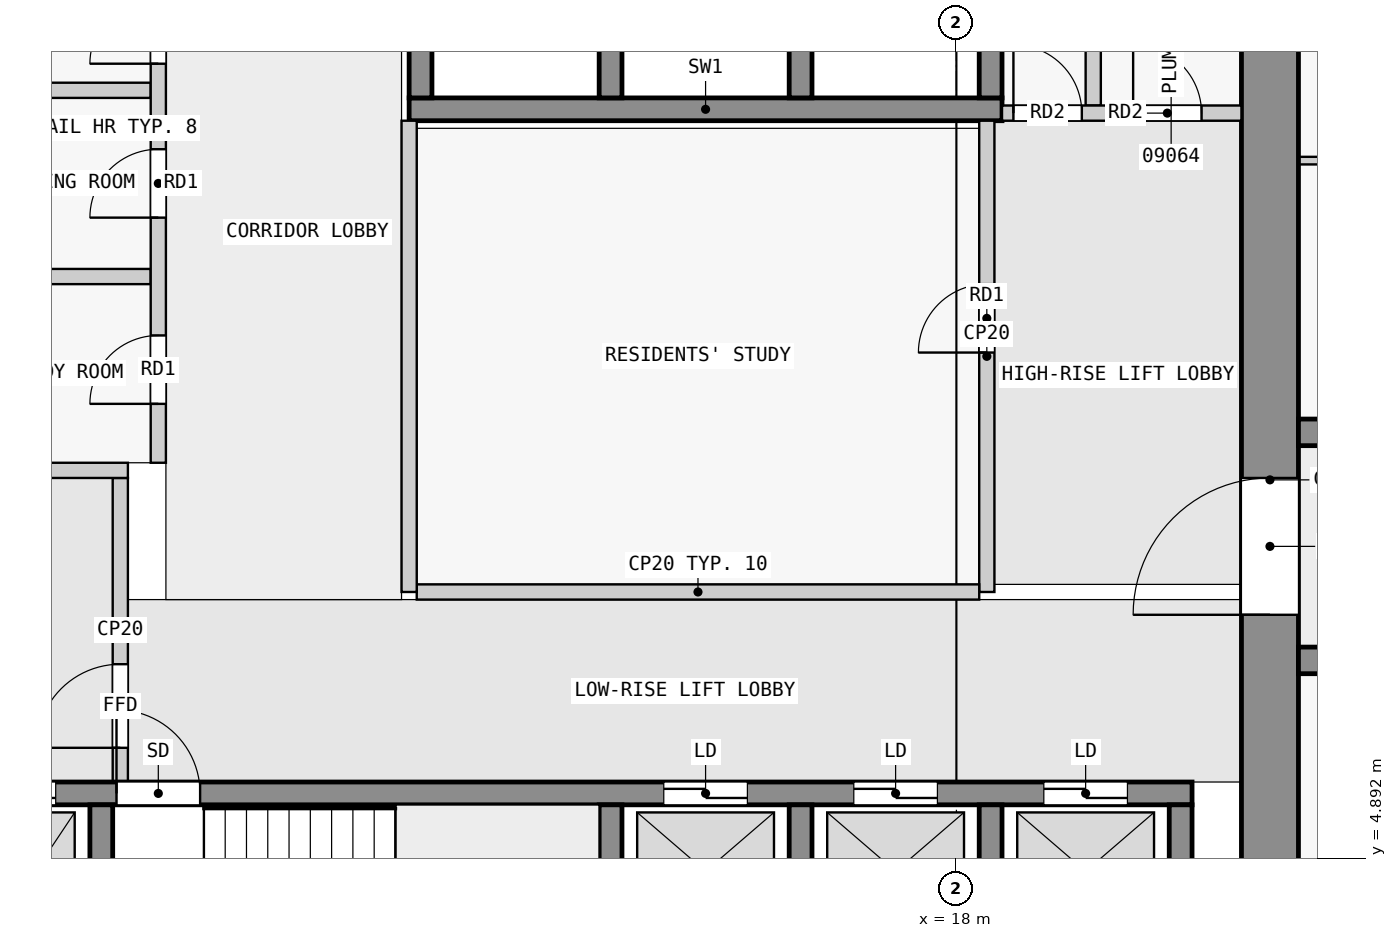
"""IFC4 building model, lengths in metres.
Left out: names, types, materials, properties, quantities, classifications, styles, units other than length and angle.
Written with IfcOpenShell. Run it as: python <this file> out.ifc"""

import sys

from ifc_helpers import new_model, si_unit, direction, frame, frame_2d, origin, place, context, subcontext, project, spatial, rectangle, extrude, element, fill, save


model = new_model("IFC4")
c1 = context("Model", 3, precision=1e-05, world=origin(), true_north=direction((0.0, 1.0)))
c2 = subcontext(c1, "Body", "Model", "MODEL_VIEW")
j1 = project(units=[si_unit("LENGTHUNIT", "METRE"), si_unit("PLANEANGLEUNIT", "RADIAN")], contexts=[c1])
p1 = place(None, origin())
s1 = spatial("IfcSite", under=j1, at=p1, CompositionType="ELEMENT")
p2 = place(p1, origin())
s2 = spatial("IfcBuilding", under=s1, at=p2, CompositionType="ELEMENT")
p3 = place(p2, frame((0.0, 0.0, 40.8)))
s3 = spatial("IfcBuildingStorey", under=s2, at=p3, CompositionType="ELEMENT", Elevation=40.8)
p4 = place(p3, frame((22.125, 2.5, 0.0), z_axis=(0.0, 0.0, 1.0), x_axis=(0.0, 1.0, 0.0)))
e1 = element("IfcWall", 1, at=p4, inside=s3, PredefinedType="SHEAR", context=c2, shape_type="SweptSolid", body=[
    extrude(rectangle(XDim=14.75, YDim=0.75, at=frame_2d((7.375, 0.0))), origin(), (0.0, 0.0, 1.0), 3.25),
])
p5 = place(p4, frame((5.6, 0.0, 0.0)))
e2 = element("IfcOpeningElement", 2, at=p5, cuts=e1, PredefinedType="OPENING", context=c2, shape_type="SweptSolid", body=[
    extrude(rectangle(XDim=1.8, YDim=2.1, at=frame_2d((0.9, 1.05))), frame((0.0, 0.385, 0.0), z_axis=(0.0, -1.0, 0.0), x_axis=(1.0, 0.0, 0.0)), (0.0, 0.0, 1.0), 0.77),
])
for number, where, z_axis, x_axis in (
    (3, (6.75, 2.8, 0.0), (0.0, 0.0, 1.0), (0.0, 1.0, 0.0)),
    (4, (13.45, 2.8, 0.0), (0.0, 0.0, 1.0), (0.0, 1.0, 0.0)),
    (5, (15.95, 2.8, 0.0), (0.0, 0.0, 1.0), (0.0, 1.0, 0.0)),
    (6, (18.45, 2.8, 0.0), (0.0, 0.0, 1.0), (0.0, 1.0, 0.0)),
    (7, (20.95, 2.8, 0.0), (0.0, 0.0, 1.0), (0.0, 1.0, 0.0)),
):
    element("IfcWall", number, at=place(p3, frame(where, z_axis=z_axis, x_axis=x_axis)), inside=s3, PredefinedType="SHEAR", context=c2, shape_type="SweptSolid", body=[
        extrude(rectangle(XDim=2.8, YDim=0.3, at=frame_2d((1.4, 0.0))), origin(), (0.0, 0.0, 1.0), 3.25),
    ])
p6 = place(p3, frame((2.3, 5.75, 0.0), z_axis=(0.0, 0.0, 1.0), x_axis=(1.0, 0.0, 0.0)))
e8 = element("IfcWall", 8, at=p6, inside=s3, PredefinedType="SHEAR", context=c2, shape_type="SweptSolid", body=[
    extrude(rectangle(XDim=18.8, YDim=0.3, at=frame_2d((9.4, 0.0))), origin(), (0.0, 0.0, 1.0), 3.25),
])
p7 = place(p6, frame((4.65, 0.0, 0.0)))
e9 = element("IfcOpeningElement", 9, at=p7, cuts=e8, PredefinedType="OPENING", context=c2, shape_type="SweptSolid", body=[
    extrude(rectangle(XDim=1.1, YDim=2.1, at=frame_2d((0.55, 1.05))), frame((0.0, 0.16, 0.0), z_axis=(0.0, -1.0, 0.0), x_axis=(1.0, 0.0, 0.0)), (0.0, 0.0, 1.0), 0.32),
])
p8 = place(p6, frame((0.45, 0.0, 0.0)))
e10 = element("IfcOpeningElement", 10, at=p8, cuts=e8, PredefinedType="OPENING", context=c2, shape_type="SweptSolid", body=[
    extrude(rectangle(XDim=1.1, YDim=2.1, at=frame_2d((0.55, 1.05))), frame((0.0, 0.16, 0.0), z_axis=(0.0, -1.0, 0.0), x_axis=(1.0, 0.0, 0.0)), (0.0, 0.0, 1.0), 0.32),
])
p9 = place(p6, frame((2.75, 0.0, 0.0)))
e11 = element("IfcOpeningElement", 11, at=p9, cuts=e8, PredefinedType="OPENING", context=c2, shape_type="SweptSolid", body=[
    extrude(rectangle(XDim=1.1, YDim=2.1, at=frame_2d((0.55, 1.05))), frame((0.0, 0.16, 0.0), z_axis=(0.0, -1.0, 0.0), x_axis=(1.0, 0.0, 0.0)), (0.0, 0.0, 1.0), 0.32),
])
p10 = place(p6, frame((11.85, 0.0, 0.0)))
e12 = element("IfcOpeningElement", 12, at=p10, cuts=e8, PredefinedType="OPENING", context=c2, shape_type="SweptSolid", body=[
    extrude(rectangle(XDim=1.1, YDim=2.1, at=frame_2d((0.55, 1.05))), frame((0.0, 0.16, 0.0), z_axis=(0.0, -1.0, 0.0), x_axis=(1.0, 0.0, 0.0)), (0.0, 0.0, 1.0), 0.32),
])
p11 = place(p6, frame((14.35, 0.0, 0.0)))
e13 = element("IfcOpeningElement", 13, at=p11, cuts=e8, PredefinedType="OPENING", context=c2, shape_type="SweptSolid", body=[
    extrude(rectangle(XDim=1.1, YDim=2.1, at=frame_2d((0.55, 1.05))), frame((0.0, 0.16, 0.0), z_axis=(0.0, -1.0, 0.0), x_axis=(1.0, 0.0, 0.0)), (0.0, 0.0, 1.0), 0.32),
])
p12 = place(p6, frame((16.85, 0.0, 0.0)))
e14 = element("IfcOpeningElement", 14, at=p12, cuts=e8, PredefinedType="OPENING", context=c2, shape_type="SweptSolid", body=[
    extrude(rectangle(XDim=1.1, YDim=2.1, at=frame_2d((0.55, 1.05))), frame((0.0, 0.16, 0.0), z_axis=(0.0, -1.0, 0.0), x_axis=(1.0, 0.0, 0.0)), (0.0, 0.0, 1.0), 0.32),
])
p13 = place(p3, frame((10.8, 14.75, 0.0), z_axis=(0.0, 0.0, 1.0), x_axis=(1.0, 0.0, 0.0)))
e15 = element("IfcWall", 15, at=p13, inside=s3, PredefinedType="SHEAR", context=c2, shape_type="SweptSolid", body=[
    extrude(rectangle(XDim=7.8, YDim=0.3, at=frame_2d((3.9, 0.0))), origin(), (0.0, 0.0, 1.0), 3.25),
])
for number, where, z_axis, x_axis in (
    (16, (10.95, 14.9, 0.0), (0.0, 0.0, 1.0), (0.0, 1.0, 0.0)),
    (17, (13.45, 14.9, 0.0), (0.0, 0.0, 1.0), (0.0, 1.0, 0.0)),
    (18, (15.95, 14.9, 0.0), (0.0, 0.0, 1.0), (0.0, 1.0, 0.0)),
    (19, (18.45, 14.9, 0.0), (0.0, 0.0, 1.0), (0.0, 1.0, 0.0)),
):
    element("IfcWall", number, at=place(p3, frame(where, z_axis=z_axis, x_axis=x_axis)), inside=s3, PredefinedType="SHEAR", context=c2, shape_type="SweptSolid", body=[
        extrude(rectangle(XDim=2.0, YDim=0.3, at=frame_2d((1.0, 0.0))), origin(), (0.0, 0.0, 1.0), 3.25),
    ])
p14 = place(p3, frame((22.5, 7.5, 0.0), z_axis=(0.0, 0.0, 1.0), x_axis=(1.0, 0.0, 0.0)))
e20 = element("IfcWall", 20, at=p14, inside=s3, PredefinedType="SHEAR", context=c2, shape_type="SweptSolid", body=[
    extrude(rectangle(XDim=22.5, YDim=0.35, at=frame_2d((11.25, 0.0))), origin(), (0.0, 0.0, 1.0), 3.25),
])
p15 = place(p14, frame((1.75, 0.0, 0.0)))
e21 = element("IfcOpeningElement", 21, at=p15, cuts=e20, PredefinedType="OPENING", context=c2, shape_type="SweptSolid", body=[
    extrude(rectangle(XDim=1.0, YDim=2.1, at=frame_2d((0.5, 1.05))), frame((0.0, 0.185, 0.0), z_axis=(0.0, -1.0, 0.0), x_axis=(1.0, 0.0, 0.0)), (0.0, 0.0, 1.0), 0.37),
])
p16 = place(p14, frame((9.25, 0.0, 0.0)))
e22 = element("IfcOpeningElement", 22, at=p16, cuts=e20, PredefinedType="OPENING", context=c2, shape_type="SweptSolid", body=[
    extrude(rectangle(XDim=1.0, YDim=2.1, at=frame_2d((0.5, 1.05))), frame((0.0, 0.185, 0.0), z_axis=(0.0, -1.0, 0.0), x_axis=(1.0, 0.0, 0.0)), (0.0, 0.0, 1.0), 0.37),
])
p17 = place(p14, frame((18.75, 0.0, 0.0)))
e23 = element("IfcOpeningElement", 23, at=p17, cuts=e20, PredefinedType="OPENING", context=c2, shape_type="SweptSolid", body=[
    extrude(rectangle(XDim=0.9, YDim=2.1, at=frame_2d((0.45, 1.05))), frame((0.0, 0.185, 0.0), z_axis=(0.0, -1.0, 0.0), x_axis=(1.0, 0.0, 0.0)), (0.0, 0.0, 1.0), 0.37),
])
p18 = place(p14, frame((20.95, 0.0, 0.0)))
e24 = element("IfcOpeningElement", 24, at=p18, cuts=e20, PredefinedType="OPENING", context=c2, shape_type="SweptSolid", body=[
    extrude(rectangle(XDim=1.0, YDim=2.1, at=frame_2d((0.5, 1.05))), frame((0.0, 0.185, 0.0), z_axis=(0.0, -1.0, 0.0), x_axis=(1.0, 0.0, 0.0)), (0.0, 0.0, 1.0), 0.37),
])
p19 = place(p3, frame((22.5, 10.5, 0.0), z_axis=(0.0, 0.0, 1.0), x_axis=(1.0, 0.0, 0.0)))
e25 = element("IfcWall", 25, at=p19, inside=s3, PredefinedType="SHEAR", context=c2, shape_type="SweptSolid", body=[
    extrude(rectangle(XDim=22.5, YDim=0.35, at=frame_2d((11.25, 0.0))), origin(), (0.0, 0.0, 1.0), 3.25),
])
p20 = place(p19, frame((1.75, 0.0, 0.0)))
e26 = element("IfcOpeningElement", 26, at=p20, cuts=e25, PredefinedType="OPENING", context=c2, shape_type="SweptSolid", body=[
    extrude(rectangle(XDim=1.0, YDim=2.1, at=frame_2d((0.5, 1.05))), frame((0.0, 0.185, 0.0), z_axis=(0.0, -1.0, 0.0), x_axis=(1.0, 0.0, 0.0)), (0.0, 0.0, 1.0), 0.37),
])
p21 = place(p19, frame((6.25, 0.0, 0.0)))
e27 = element("IfcOpeningElement", 27, at=p21, cuts=e25, PredefinedType="OPENING", context=c2, shape_type="SweptSolid", body=[
    extrude(rectangle(XDim=1.0, YDim=2.1, at=frame_2d((0.5, 1.05))), frame((0.0, 0.185, 0.0), z_axis=(0.0, -1.0, 0.0), x_axis=(1.0, 0.0, 0.0)), (0.0, 0.0, 1.0), 0.37),
])
p22 = place(p19, frame((10.75, 0.0, 0.0)))
e28 = element("IfcOpeningElement", 28, at=p22, cuts=e25, PredefinedType="OPENING", context=c2, shape_type="SweptSolid", body=[
    extrude(rectangle(XDim=1.0, YDim=2.1, at=frame_2d((0.5, 1.05))), frame((0.0, 0.185, 0.0), z_axis=(0.0, -1.0, 0.0), x_axis=(1.0, 0.0, 0.0)), (0.0, 0.0, 1.0), 0.37),
])
p23 = place(p19, frame((16.85, 0.0, 0.0)))
e29 = element("IfcOpeningElement", 29, at=p23, cuts=e25, PredefinedType="OPENING", context=c2, shape_type="SweptSolid", body=[
    extrude(rectangle(XDim=1.0, YDim=2.1, at=frame_2d((0.5, 1.05))), frame((0.0, 0.185, 0.0), z_axis=(0.0, -1.0, 0.0), x_axis=(1.0, 0.0, 0.0)), (0.0, 0.0, 1.0), 0.37),
])
p24 = place(p3, frame((7.0, 5.9, 0.0), z_axis=(0.0, 0.0, 1.0), x_axis=(0.0, 1.0, 0.0)))
e30 = element("IfcWall", 30, at=p24, inside=s3, PredefinedType="PARTITIONING", context=c2, shape_type="SweptSolid", body=[
    extrude(rectangle(XDim=4.0, YDim=0.2, at=frame_2d((2.0, 0.0))), origin(), (0.0, 0.0, 1.0), 3.25),
])
p25 = place(p24, frame((0.45, 0.0, 0.0)))
e31 = element("IfcOpeningElement", 31, at=p25, cuts=e30, PredefinedType="OPENING", context=c2, shape_type="SweptSolid", body=[
    extrude(rectangle(XDim=1.1, YDim=2.1, at=frame_2d((0.55, 1.05))), frame((0.0, 0.11, 0.0), z_axis=(0.0, -1.0, 0.0), x_axis=(1.0, 0.0, 0.0)), (0.0, 0.0, 1.0), 0.22),
])
p26 = place(p3, frame((5.15, 10.0, 0.0), z_axis=(0.0, 0.0, 1.0), x_axis=(1.0, 0.0, 0.0)))
e32 = element("IfcWall", 32, at=p26, inside=s3, PredefinedType="PARTITIONING", context=c2, shape_type="SweptSolid", body=[
    extrude(rectangle(XDim=1.95, YDim=0.2, at=frame_2d((0.975, 0.0))), origin(), (0.0, 0.0, 1.0), 3.25),
])
p27 = place(p3, frame((10.8, 8.4, 0.0), z_axis=(0.0, 0.0, 1.0), x_axis=(0.0, 1.0, 0.0)))
e33 = element("IfcWall", 33, at=p27, inside=s3, PredefinedType="PARTITIONING", context=c2, shape_type="SweptSolid", body=[
    extrude(rectangle(XDim=6.2, YDim=0.2, at=frame_2d((3.1, 0.0))), origin(), (0.0, 0.0, 1.0), 3.25),
])
p28 = place(p3, frame((10.9, 8.4, 0.0), z_axis=(0.0, 0.0, 1.0), x_axis=(1.0, 0.0, 0.0)))
e34 = element("IfcWall", 34, at=p28, inside=s3, PredefinedType="PARTITIONING", context=c2, shape_type="SweptSolid", body=[
    extrude(rectangle(XDim=7.4, YDim=0.2, at=frame_2d((3.7, 0.0))), origin(), (0.0, 0.0, 1.0), 3.25),
])
p29 = place(p3, frame((18.4, 8.4, 0.0), z_axis=(0.0, 0.0, 1.0), x_axis=(0.0, 1.0, 0.0)))
e35 = element("IfcWall", 35, at=p29, inside=s3, PredefinedType="PARTITIONING", context=c2, shape_type="SweptSolid", body=[
    extrude(rectangle(XDim=6.2, YDim=0.2, at=frame_2d((3.1, 0.0))), origin(), (0.0, 0.0, 1.0), 3.25),
])
p30 = place(p29, frame((3.15, 0.0, 0.0)))
e36 = element("IfcOpeningElement", 36, at=p30, cuts=e35, PredefinedType="OPENING", context=c2, shape_type="SweptSolid", body=[
    extrude(rectangle(XDim=0.9, YDim=2.1, at=frame_2d((0.45, 1.05))), frame((0.0, 0.11, 0.0), z_axis=(0.0, -1.0, 0.0), x_axis=(1.0, 0.0, 0.0)), (0.0, 0.0, 1.0), 0.22),
])
p31 = place(p3, frame((7.5, 10.1, 0.0), z_axis=(0.0, 0.0, 1.0), x_axis=(0.0, 1.0, 0.0)))
e37 = element("IfcWall", 37, at=p31, inside=s3, PredefinedType="PARTITIONING", context=c2, shape_type="SweptSolid", body=[
    extrude(rectangle(XDim=7.15, YDim=0.2, at=frame_2d((3.575, 0.0))), origin(), (0.0, 0.0, 1.0), 3.25),
])
p32 = place(p31, frame((0.775, 0.0, 0.0)))
e38 = element("IfcOpeningElement", 38, at=p32, cuts=e37, PredefinedType="OPENING", context=c2, shape_type="SweptSolid", body=[
    extrude(rectangle(XDim=0.9, YDim=2.1, at=frame_2d((0.45, 1.05))), frame((0.0, 0.11, 0.0), z_axis=(0.0, -1.0, 0.0), x_axis=(1.0, 0.0, 0.0)), (0.0, 0.0, 1.0), 0.22),
])
p33 = place(p31, frame((3.225, 0.0, 0.0)))
e39 = element("IfcOpeningElement", 39, at=p33, cuts=e37, PredefinedType="OPENING", context=c2, shape_type="SweptSolid", body=[
    extrude(rectangle(XDim=0.9, YDim=2.1, at=frame_2d((0.45, 1.05))), frame((0.0, 0.11, 0.0), z_axis=(0.0, -1.0, 0.0), x_axis=(1.0, 0.0, 0.0)), (0.0, 0.0, 1.0), 0.22),
])
p34 = place(p31, frame((5.25, 0.0, 0.0)))
e40 = element("IfcOpeningElement", 40, at=p34, cuts=e37, PredefinedType="OPENING", context=c2, shape_type="SweptSolid", body=[
    extrude(rectangle(XDim=0.9, YDim=2.1, at=frame_2d((0.45, 1.05))), frame((0.0, 0.11, 0.0), z_axis=(0.0, -1.0, 0.0), x_axis=(1.0, 0.0, 0.0)), (0.0, 0.0, 1.0), 0.22),
])
for number, where, z_axis, x_axis in (
    (41, (5.15, 12.55, 0.0), (0.0, 0.0, 1.0), (1.0, 0.0, 0.0)),
    (42, (5.15, 15.0, 0.0), (0.0, 0.0, 1.0), (1.0, 0.0, 0.0)),
):
    element("IfcWall", number, at=place(p3, frame(where, z_axis=z_axis, x_axis=x_axis)), inside=s3, PredefinedType="PARTITIONING", context=c2, shape_type="SweptSolid", body=[
        extrude(rectangle(XDim=2.25, YDim=0.2, at=frame_2d((1.125, 0.0))), origin(), (0.0, 0.0, 1.0), 3.25),
    ])
p35 = place(p3, frame((18.6, 14.7, 0.0), z_axis=(0.0, 0.0, 1.0), x_axis=(1.0, 0.0, 0.0)))
e43 = element("IfcWall", 43, at=p35, inside=s3, PredefinedType="PARTITIONING", context=c2, shape_type="SweptSolid", body=[
    extrude(rectangle(XDim=3.15, YDim=0.2, at=frame_2d((1.575, 0.0))), origin(), (0.0, 0.0, 1.0), 3.25),
])
p36 = place(p35, frame((0.15, 0.0, 0.0)))
e44 = element("IfcOpeningElement", 44, at=p36, cuts=e43, PredefinedType="OPENING", context=c2, shape_type="SweptSolid", body=[
    extrude(rectangle(XDim=0.9, YDim=2.1, at=frame_2d((0.45, 1.05))), frame((0.0, 0.11, 0.0), z_axis=(0.0, -1.0, 0.0), x_axis=(1.0, 0.0, 0.0)), (0.0, 0.0, 1.0), 0.22),
])
p37 = place(p35, frame((1.725, 0.0, 0.0)))
e45 = element("IfcOpeningElement", 45, at=p37, cuts=e43, PredefinedType="OPENING", context=c2, shape_type="SweptSolid", body=[
    extrude(rectangle(XDim=0.9, YDim=2.1, at=frame_2d((0.45, 1.05))), frame((0.0, 0.11, 0.0), z_axis=(0.0, -1.0, 0.0), x_axis=(1.0, 0.0, 0.0)), (0.0, 0.0, 1.0), 0.22),
])
p38 = place(p3, frame((19.8, 14.8, 0.0), z_axis=(0.0, 0.0, 1.0), x_axis=(0.0, 1.0, 0.0)))
e46 = element("IfcWall", 46, at=p38, inside=s3, PredefinedType="PARTITIONING", context=c2, shape_type="SweptSolid", body=[
    extrude(rectangle(XDim=2.45, YDim=0.2, at=frame_2d((1.225, 0.0))), origin(), (0.0, 0.0, 1.0), 3.25),
])
p39 = place(p3, frame((23.95, 14.075, 0.0), z_axis=(0.0, 0.0, 1.0), x_axis=(-1.0, 0.0, 0.0)))
e47 = element("IfcWall", 47, at=p39, inside=s3, PredefinedType="PARTITIONING", context=c2, shape_type="SweptSolid", body=[
    extrude(rectangle(XDim=1.45, YDim=0.1, at=frame_2d((0.725, 0.0))), origin(), (0.0, 0.0, 1.0), 3.25),
])
p40 = place(p25, origin())
e48 = element("IfcDoor", 48, at=p40, inside=s3, OperationType="SINGLE_SWING_LEFT", PredefinedType="DOOR", context=c2, shape_type="SweptSolid", body=[
    extrude(rectangle(XDim=1.1, YDim=2.1, at=frame_2d((0.55, 1.05))), frame((0.0, 0.025, 0.0), z_axis=(0.0, -1.0, 0.0), x_axis=(1.0, 0.0, 0.0)), (0.0, 0.0, 1.0), 0.05),
])
fill(e31, e48)
p41 = place(p30, origin())
e49 = element("IfcDoor", 49, at=p41, inside=s3, OperationType="SINGLE_SWING_LEFT", PredefinedType="DOOR", context=c2, shape_type="SweptSolid", body=[
    extrude(rectangle(XDim=0.9, YDim=2.1, at=frame_2d((0.45, 1.05))), frame((0.0, 0.025, 0.0), z_axis=(0.0, -1.0, 0.0), x_axis=(1.0, 0.0, 0.0)), (0.0, 0.0, 1.0), 0.05),
])
fill(e36, e49)
p42 = place(p7, origin())
e50 = element("IfcDoor", 50, at=p42, inside=s3, OperationType="SINGLE_SWING_LEFT", PredefinedType="DOOR", context=c2, shape_type="SweptSolid", body=[
    extrude(rectangle(XDim=1.1, YDim=2.1, at=frame_2d((0.55, 1.05))), frame((0.0, 0.025, 0.0), z_axis=(0.0, -1.0, 0.0), x_axis=(1.0, 0.0, 0.0)), (0.0, 0.0, 1.0), 0.05),
])
fill(e9, e50)
p43 = place(p9, origin())
e51 = element("IfcDoor", 51, at=p43, inside=s3, OperationType="DOUBLE_DOOR_SLIDING", PredefinedType="DOOR", context=c2, shape_type="SweptSolid", body=[
    extrude(rectangle(XDim=1.1, YDim=2.1, at=frame_2d((0.55, 1.05))), frame((0.0, 0.025, 0.0), z_axis=(0.0, -1.0, 0.0), x_axis=(1.0, 0.0, 0.0)), (0.0, 0.0, 1.0), 0.05),
])
fill(e11, e51)
p44 = place(p10, origin())
e52 = element("IfcDoor", 52, at=p44, inside=s3, OperationType="DOUBLE_DOOR_SLIDING", PredefinedType="DOOR", context=c2, shape_type="SweptSolid", body=[
    extrude(rectangle(XDim=1.1, YDim=2.1, at=frame_2d((0.55, 1.05))), frame((0.0, 0.025, 0.0), z_axis=(0.0, -1.0, 0.0), x_axis=(1.0, 0.0, 0.0)), (0.0, 0.0, 1.0), 0.05),
])
fill(e12, e52)
p45 = place(p11, origin())
e53 = element("IfcDoor", 53, at=p45, inside=s3, OperationType="DOUBLE_DOOR_SLIDING", PredefinedType="DOOR", context=c2, shape_type="SweptSolid", body=[
    extrude(rectangle(XDim=1.1, YDim=2.1, at=frame_2d((0.55, 1.05))), frame((0.0, 0.025, 0.0), z_axis=(0.0, -1.0, 0.0), x_axis=(1.0, 0.0, 0.0)), (0.0, 0.0, 1.0), 0.05),
])
fill(e13, e53)
p46 = place(p12, origin())
e54 = element("IfcDoor", 54, at=p46, inside=s3, OperationType="DOUBLE_DOOR_SLIDING", PredefinedType="DOOR", context=c2, shape_type="SweptSolid", body=[
    extrude(rectangle(XDim=1.1, YDim=2.1, at=frame_2d((0.55, 1.05))), frame((0.0, 0.025, 0.0), z_axis=(0.0, -1.0, 0.0), x_axis=(1.0, 0.0, 0.0)), (0.0, 0.0, 1.0), 0.05),
])
fill(e14, e54)
p47 = place(p5, origin())
e55 = element("IfcDoor", 55, at=p47, inside=s3, OperationType="DOUBLE_DOOR_SINGLE_SWING", PredefinedType="DOOR", context=c2, shape_type="SweptSolid", body=[
    extrude(rectangle(XDim=1.8, YDim=2.1, at=frame_2d((0.9, 1.05))), frame((0.0, 0.025, 0.0), z_axis=(0.0, -1.0, 0.0), x_axis=(1.0, 0.0, 0.0)), (0.0, 0.0, 1.0), 0.05),
])
fill(e2, e55)
p48 = place(p32, origin())
e56 = element("IfcDoor", 56, at=p48, inside=s3, OperationType="SINGLE_SWING_RIGHT", PredefinedType="DOOR", context=c2, shape_type="SweptSolid", body=[
    extrude(rectangle(XDim=0.9, YDim=2.1, at=frame_2d((0.45, 1.05))), frame((0.0, 0.025, 0.0), z_axis=(0.0, -1.0, 0.0), x_axis=(1.0, 0.0, 0.0)), (0.0, 0.0, 1.0), 0.05),
])
fill(e38, e56)
p49 = place(p33, origin())
e57 = element("IfcDoor", 57, at=p49, inside=s3, OperationType="SINGLE_SWING_RIGHT", PredefinedType="DOOR", context=c2, shape_type="SweptSolid", body=[
    extrude(rectangle(XDim=0.9, YDim=2.1, at=frame_2d((0.45, 1.05))), frame((0.0, 0.025, 0.0), z_axis=(0.0, -1.0, 0.0), x_axis=(1.0, 0.0, 0.0)), (0.0, 0.0, 1.0), 0.05),
])
fill(e39, e57)
p50 = place(p34, origin())
e58 = element("IfcDoor", 58, at=p50, inside=s3, OperationType="SINGLE_SWING_RIGHT", PredefinedType="DOOR", context=c2, shape_type="SweptSolid", body=[
    extrude(rectangle(XDim=0.9, YDim=2.1, at=frame_2d((0.45, 1.05))), frame((0.0, 0.025, 0.0), z_axis=(0.0, -1.0, 0.0), x_axis=(1.0, 0.0, 0.0)), (0.0, 0.0, 1.0), 0.05),
])
fill(e40, e58)
p51 = place(p36, origin())
e59 = element("IfcDoor", 59, at=p51, inside=s3, OperationType="SINGLE_SWING_LEFT", PredefinedType="DOOR", context=c2, shape_type="SweptSolid", body=[
    extrude(rectangle(XDim=0.9, YDim=2.1, at=frame_2d((0.45, 1.05))), frame((0.0, 0.025, 0.0), z_axis=(0.0, -1.0, 0.0), x_axis=(1.0, 0.0, 0.0)), (0.0, 0.0, 1.0), 0.05),
])
fill(e44, e59)
p52 = place(p37, origin())
e60 = element("IfcDoor", 60, at=p52, inside=s3, OperationType="SINGLE_SWING_LEFT", PredefinedType="DOOR", context=c2, shape_type="SweptSolid", body=[
    extrude(rectangle(XDim=0.9, YDim=2.1, at=frame_2d((0.45, 1.05))), frame((0.0, 0.025, 0.0), z_axis=(0.0, -1.0, 0.0), x_axis=(1.0, 0.0, 0.0)), (0.0, 0.0, 1.0), 0.05),
])
fill(e45, e60)
save(model, sys.argv[1])
